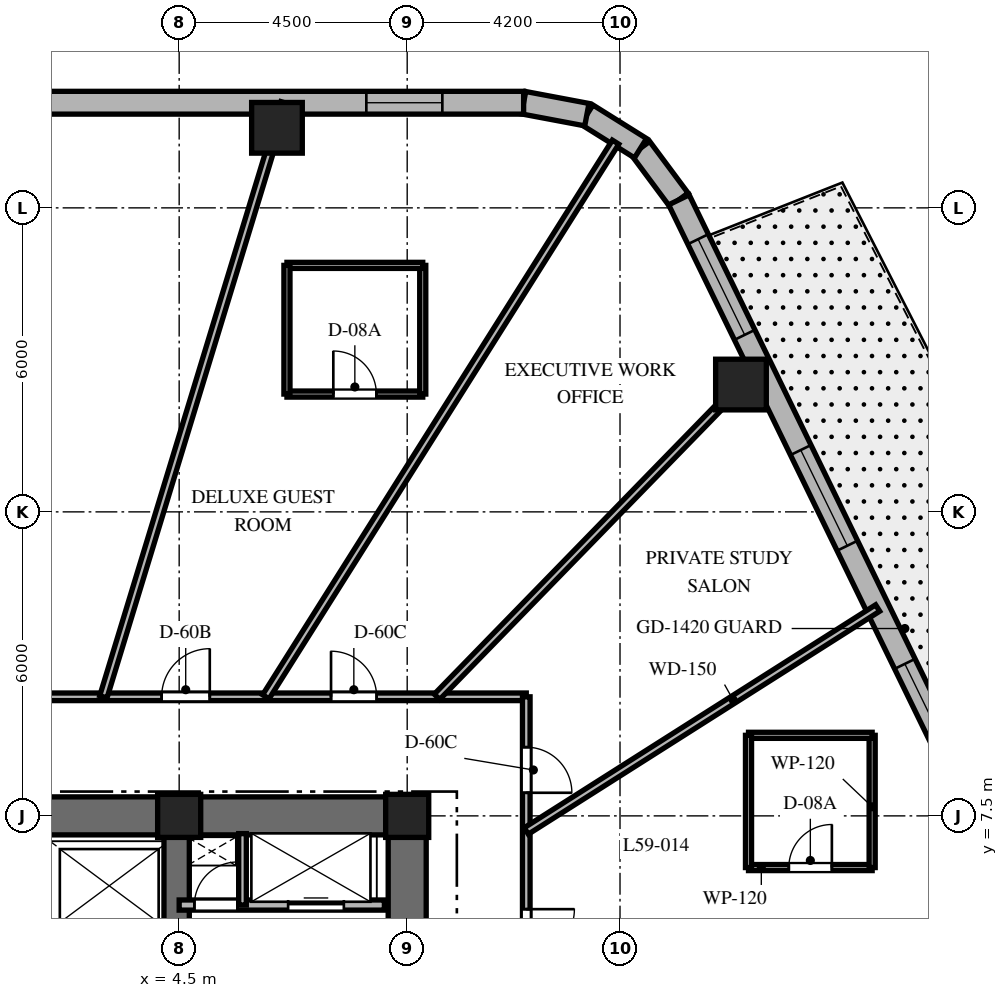
"""IFC4 building model, lengths in metres.
Left out: names, types, materials, properties, quantities, classifications, styles, units other than length and angle.
Written with IfcOpenShell. Run it as: python <this file> out.ifc"""

import sys

from ifc_helpers import new_model, si_unit, direction, frame, frame_2d, origin, origin_2d, place, context, subcontext, project, spatial, rectangle, extrude, element, fill, save


model = new_model("IFC4")
c1 = context("Model", 3, precision=1e-05, world=origin(), true_north=direction((0.0, 1.0)))
c2 = subcontext(c1, "Body", "Model", "MODEL_VIEW")
j1 = project(units=[si_unit("LENGTHUNIT", "METRE"), si_unit("PLANEANGLEUNIT", "RADIAN")], contexts=[c1])
p1 = place(None, origin())
s1 = spatial("IfcSite", under=j1, at=p1, CompositionType="ELEMENT")
p2 = place(p1, origin())
s2 = spatial("IfcBuilding", under=s1, at=p2, CompositionType="ELEMENT")
p3 = place(p2, frame((0.0, 0.0, 236.9)))
s3 = spatial("IfcBuildingStorey", under=s2, at=p3, CompositionType="ELEMENT", Elevation=236.9)
p4 = place(p3, frame((1.85, 7.5, 0.0), z_axis=(0.0, 0.0, 1.0), x_axis=(1.0, 0.0, 0.0)))
e1 = element("IfcWall", 1, at=p4, inside=s3, PredefinedType="SHEAR", context=c2, shape_type="SweptSolid", body=[
    extrude(rectangle(XDim=7.525, YDim=0.75, at=frame_2d((3.762, 0.0))), origin(), (0.0, 0.0, 1.0), 3.8),
])
p5 = place(p3, frame((9.0, -7.125, 0.0), z_axis=(0.0, 0.0, 1.0), x_axis=(0.0, 1.0, 0.0)))
e2 = element("IfcWall", 2, at=p5, inside=s3, PredefinedType="SHEAR", context=c2, shape_type="SweptSolid", body=[
    extrude(rectangle(XDim=14.25, YDim=0.75, at=frame_2d((7.125, 0.0))), origin(), (0.0, 0.0, 1.0), 3.8),
])
p6 = place(p5, frame((10.25, 0.0, 0.0)))
e3 = element("IfcOpeningElement", 3, at=p6, cuts=e2, PredefinedType="OPENING", context=c2, shape_type="SweptSolid", body=[
    extrude(rectangle(XDim=1.05, YDim=2.15, at=frame_2d((0.525, 1.075))), frame((0.0, 0.385, 0.0), z_axis=(0.0, -1.0, 0.0), x_axis=(1.0, 0.0, 0.0)), (0.0, 0.0, 1.0), 0.77),
])
p7 = place(p3, frame((4.45, 2.25, 0.0), z_axis=(0.0, 0.0, 1.0), x_axis=(0.0, 1.0, 0.0)))
e4 = element("IfcWall", 4, at=p7, inside=s3, PredefinedType="SHEAR", context=c2, shape_type="SweptSolid", body=[
    extrude(rectangle(XDim=4.875, YDim=0.5, at=frame_2d((2.438, 0.0))), origin(), (0.0, 0.0, 1.0), 3.8),
])
for number, where, z_axis, x_axis in (
    (5, (9.0, 7.5, 0.0), (0.0, 0.0, 1.0), (1.0, 0.0, 0.0)),
    (6, (4.5, 7.5, 0.0), (0.0, 0.0, 1.0), (1.0, 0.0, 0.0)),
):
    element("IfcColumn", number, at=place(p3, frame(where, z_axis=z_axis, x_axis=x_axis)), inside=s3, PredefinedType="COLUMN", context=c2, shape_type="SweptSolid", body=[
        extrude(rectangle(XDim=0.85, YDim=0.85, at=origin_2d()), origin(), (0.0, 0.0, 1.0), 3.8),
    ])
for number, where, z_axis, x_axis in (
    (7, (15.587, 16.013, 0.0), (0.0, 0.0, 1.0), (1.0, 0.0, 0.0)),
    (8, (6.43, 21.08, 0.0), (0.0, 0.0, 1.0), (1.0, 0.0, 0.0)),
):
    element("IfcColumn", number, at=place(p3, frame(where, z_axis=z_axis, x_axis=x_axis)), inside=s3, PredefinedType="COLUMN", context=c2, shape_type="SweptSolid", body=[
        extrude(rectangle(XDim=1.0, YDim=1.0, at=origin_2d()), origin(), (0.0, 0.0, 1.0), 3.8),
    ])
p8 = place(p3, frame((14.362, 19.658, 0.0), z_axis=(0.0, 0.0, 1.0), x_axis=(-0.596642462792, 0.80250717853, 0.0)))
e9 = element("IfcWall", 9, at=p8, inside=s3, PredefinedType="SOLIDWALL", context=c2, shape_type="SweptSolid", body=[
    extrude(rectangle(XDim=1.27, YDim=0.45, at=frame_2d((0.635, 0.0))), origin(), (0.0, 0.0, 1.0), 3.5),
])
p9 = place(p3, frame((13.604, 20.678, 0.0), z_axis=(0.0, 0.0, 1.0), x_axis=(-0.847910404124, 0.53013955387, 0.0)))
e10 = element("IfcWall", 10, at=p9, inside=s3, PredefinedType="SOLIDWALL", context=c2, shape_type="SweptSolid", body=[
    extrude(rectangle(XDim=1.249, YDim=0.45, at=frame_2d((0.624, 0.0))), origin(), (0.0, 0.0, 1.0), 3.5),
])
p10 = place(p3, frame((12.546, 21.34, 0.0), z_axis=(0.0, 0.0, 1.0), x_axis=(-0.982686750835, 0.18527479519, 0.0)))
e11 = element("IfcWall", 11, at=p10, inside=s3, PredefinedType="SOLIDWALL", context=c2, shape_type="SweptSolid", body=[
    extrude(rectangle(XDim=1.27, YDim=0.45, at=frame_2d((0.635, 0.0))), origin(), (0.0, 0.0, 1.0), 3.5),
])
p11 = place(p3, frame((22.74, 2.452, 0.0), z_axis=(0.0, 0.0, 1.0), x_axis=(-0.437753424814, 0.899095066755, 0.0)))
e12 = element("IfcWall", 12, at=p11, inside=s3, PredefinedType="SOLIDWALL", context=c2, shape_type="SweptSolid", body=[
    extrude(rectangle(XDim=19.137, YDim=0.45, at=frame_2d((9.569, 0.0))), origin(), (0.0, 0.0, 1.0), 3.5),
])
p12 = place(p11, frame((4.763, 0.0, 0.0)))
e13 = element("IfcOpeningElement", 13, at=p12, cuts=e12, PredefinedType="OPENING", context=c2, shape_type="SweptSolid", body=[
    extrude(rectangle(XDim=1.0, YDim=2.15, at=frame_2d((0.5, 1.075))), frame((0.0, 0.235, 0.0), z_axis=(0.0, -1.0, 0.0), x_axis=(1.0, 0.0, 0.0)), (0.0, 0.0, 1.0), 0.47),
])
p13 = place(p11, frame((6.851, 0.0, 0.8)))
e14 = element("IfcOpeningElement", 14, at=p13, cuts=e12, PredefinedType="OPENING", context=c2, shape_type="SweptSolid", body=[
    extrude(rectangle(XDim=2.1, YDim=1.85, at=frame_2d((1.05, 0.925))), frame((0.0, 0.235, 0.0), z_axis=(0.0, -1.0, 0.0), x_axis=(1.0, 0.0, 0.0)), (0.0, 0.0, 1.0), 0.47),
])
p14 = place(p11, frame((11.545, 0.0, 0.8)))
e15 = element("IfcOpeningElement", 15, at=p14, cuts=e12, PredefinedType="OPENING", context=c2, shape_type="SweptSolid", body=[
    extrude(rectangle(XDim=2.1, YDim=1.85, at=frame_2d((1.05, 0.925))), frame((0.0, 0.235, 0.0), z_axis=(0.0, -1.0, 0.0), x_axis=(1.0, 0.0, 0.0)), (0.0, 0.0, 1.0), 0.47),
])
p15 = place(p11, frame((16.173, 0.0, 0.8)))
e16 = element("IfcOpeningElement", 16, at=p15, cuts=e12, PredefinedType="OPENING", context=c2, shape_type="SweptSolid", body=[
    extrude(rectangle(XDim=2.1, YDim=1.85, at=frame_2d((1.05, 0.925))), frame((0.0, 0.235, 0.0), z_axis=(0.0, -1.0, 0.0), x_axis=(1.0, 0.0, 0.0)), (0.0, 0.0, 1.0), 0.47),
])
p16 = place(p11, frame((0.916, 0.0, 0.8)))
e17 = element("IfcOpeningElement", 17, at=p16, cuts=e12, PredefinedType="OPENING", context=c2, shape_type="SweptSolid", body=[
    extrude(rectangle(XDim=2.1, YDim=1.85, at=frame_2d((1.05, 0.925))), frame((0.0, 0.235, 0.0), z_axis=(0.0, -1.0, 0.0), x_axis=(1.0, 0.0, 0.0)), (0.0, 0.0, 1.0), 0.47),
])
p17 = place(p3, frame((11.298, 21.575, 0.0), z_axis=(0.0, 0.0, 1.0), x_axis=(-1.0, 0.0, 0.0)))
e18 = element("IfcWall", 18, at=p17, inside=s3, PredefinedType="SOLIDWALL", context=c2, shape_type="SweptSolid", body=[
    extrude(rectangle(XDim=24.399, YDim=0.45, at=frame_2d((12.2, 0.0))), origin(), (0.0, 0.0, 1.0), 3.5),
])
p18 = place(p17, frame((1.604, 0.0, 0.8)))
e19 = element("IfcOpeningElement", 19, at=p18, cuts=e18, PredefinedType="OPENING", context=c2, shape_type="SweptSolid", body=[
    extrude(rectangle(XDim=1.5, YDim=1.8, at=frame_2d((0.75, 0.9))), frame((0.0, 0.235, 0.0), z_axis=(0.0, -1.0, 0.0), x_axis=(1.0, 0.0, 0.0)), (0.0, 0.0, 1.0), 0.47),
])
p19 = place(p17, frame((11.451, 0.0, 0.8)))
e20 = element("IfcOpeningElement", 20, at=p19, cuts=e18, PredefinedType="OPENING", context=c2, shape_type="SweptSolid", body=[
    extrude(rectangle(XDim=1.5, YDim=1.8, at=frame_2d((0.75, 0.9))), frame((0.0, 0.235, 0.0), z_axis=(0.0, -1.0, 0.0), x_axis=(1.0, 0.0, 0.0)), (0.0, 0.0, 1.0), 0.47),
])
p20 = place(p17, frame((21.296, 0.0, 0.8)))
e21 = element("IfcOpeningElement", 21, at=p20, cuts=e18, PredefinedType="OPENING", context=c2, shape_type="SweptSolid", body=[
    extrude(rectangle(XDim=1.5, YDim=1.8, at=frame_2d((0.75, 0.9))), frame((0.0, 0.235, 0.0), z_axis=(0.0, -1.0, 0.0), x_axis=(1.0, 0.0, 0.0)), (0.0, 0.0, 1.0), 0.47),
])
p21 = place(p3, frame((4.5, 5.74, 0.0), z_axis=(0.0, 0.0, 1.0), x_axis=(1.0, 0.0, 0.0)))
e22 = element("IfcWall", 22, at=p21, inside=s3, PredefinedType="PARTITIONING", context=c2, shape_type="SweptSolid", body=[
    extrude(rectangle(XDim=4.05, YDim=0.2, at=frame_2d((2.025, 0.0))), origin(), (0.0, 0.0, 1.0), 3.5),
])
p22 = place(p21, frame((0.3, 0.0, 0.0)))
e23 = element("IfcOpeningElement", 23, at=p22, cuts=e22, PredefinedType="OPENING", context=c2, shape_type="SweptSolid", body=[
    extrude(rectangle(XDim=0.85, YDim=2.03, at=frame_2d((0.425, 1.015))), frame((0.0, 0.11, 0.0), z_axis=(0.0, -1.0, 0.0), x_axis=(1.0, 0.0, 0.0)), (0.0, 0.0, 1.0), 0.22),
])
p23 = place(p21, frame((2.15, 0.0, 0.0)))
e24 = element("IfcOpeningElement", 24, at=p23, cuts=e22, PredefinedType="OPENING", context=c2, shape_type="SweptSolid", body=[
    extrude(rectangle(XDim=1.1, YDim=2.2, at=frame_2d((0.55, 1.1))), frame((0.0, 0.11, 0.0), z_axis=(0.0, -1.0, 0.0), x_axis=(1.0, 0.0, 0.0)), (0.0, 0.0, 1.0), 0.22),
])
p24 = place(p3, frame((5.75, 5.74, 0.0), z_axis=(0.0, 0.0, 1.0), x_axis=(0.0, 1.0, 0.0)))
e25 = element("IfcWall", 25, at=p24, inside=s3, PredefinedType="PARTITIONING", context=c2, shape_type="SweptSolid", body=[
    extrude(rectangle(XDim=1.41, YDim=0.15, at=frame_2d((0.705, 0.0))), origin(), (0.0, 0.0, 1.0), 3.5),
])
p25 = place(p3, frame((0.92, 9.85, 0.0), z_axis=(0.0, 0.0, 1.0), x_axis=(1.0, 0.0, 0.0)))
e26 = element("IfcWall", 26, at=p25, inside=s3, PredefinedType="PARTITIONING", context=c2, shape_type="SweptSolid", body=[
    extrude(rectangle(XDim=10.43, YDim=0.15, at=frame_2d((5.215, 0.0))), origin(), (0.0, 0.0, 1.0), 2.99),
])
p26 = place(p25, frame((6.577, 0.0, 0.0)))
e27 = element("IfcOpeningElement", 27, at=p26, cuts=e26, PredefinedType="OPENING", context=c2, shape_type="SweptSolid", body=[
    extrude(rectangle(XDim=0.9, YDim=2.03, at=frame_2d((0.45, 1.015))), frame((0.0, 0.085, 0.0), z_axis=(0.0, -1.0, 0.0), x_axis=(1.0, 0.0, 0.0)), (0.0, 0.0, 1.0), 0.17),
])
p27 = place(p25, frame((3.234, 0.0, 0.0)))
e28 = element("IfcOpeningElement", 28, at=p27, cuts=e26, PredefinedType="OPENING", context=c2, shape_type="SweptSolid", body=[
    extrude(rectangle(XDim=0.95, YDim=2.03, at=frame_2d((0.475, 1.015))), frame((0.0, 0.085, 0.0), z_axis=(0.0, -1.0, 0.0), x_axis=(1.0, 0.0, 0.0)), (0.0, 0.0, 1.0), 0.17),
])
p28 = place(p3, frame((11.35, 9.85, 0.0), z_axis=(0.0, 0.0, 1.0), x_axis=(0.0, -1.0, 0.0)))
e29 = element("IfcWall", 29, at=p28, inside=s3, PredefinedType="PARTITIONING", context=c2, shape_type="SweptSolid", body=[
    extrude(rectangle(XDim=12.4, YDim=0.15, at=frame_2d((6.2, 0.0))), origin(), (0.0, 0.0, 1.0), 2.99),
])
p29 = place(p28, frame((4.191, 0.0, 0.0)))
e30 = element("IfcOpeningElement", 30, at=p29, cuts=e29, PredefinedType="OPENING", context=c2, shape_type="SweptSolid", body=[
    extrude(rectangle(XDim=0.95, YDim=2.03, at=frame_2d((0.475, 1.015))), frame((0.0, 0.085, 0.0), z_axis=(0.0, -1.0, 0.0), x_axis=(1.0, 0.0, 0.0)), (0.0, 0.0, 1.0), 0.17),
])
p30 = place(p28, frame((0.994, 0.0, 0.0)))
e31 = element("IfcOpeningElement", 31, at=p30, cuts=e29, PredefinedType="OPENING", context=c2, shape_type="SweptSolid", body=[
    extrude(rectangle(XDim=0.9, YDim=2.03, at=frame_2d((0.45, 1.015))), frame((0.0, 0.085, 0.0), z_axis=(0.0, -1.0, 0.0), x_axis=(1.0, 0.0, 0.0)), (0.0, 0.0, 1.0), 0.17),
])
p31 = place(p28, frame((8.835, 0.0, 0.0)))
e32 = element("IfcOpeningElement", 32, at=p31, cuts=e29, PredefinedType="OPENING", context=c2, shape_type="SweptSolid", body=[
    extrude(rectangle(XDim=0.95, YDim=2.03, at=frame_2d((0.475, 1.015))), frame((0.0, 0.085, 0.0), z_axis=(0.0, -1.0, 0.0), x_axis=(1.0, 0.0, 0.0)), (0.0, 0.0, 1.0), 0.17),
])
p32 = place(p3, frame((11.35, 3.121, 0.0), z_axis=(0.0, 0.0, 1.0), x_axis=(0.964212793822, 0.265129568758, 0.0)))
e33 = element("IfcWall", 33, at=p32, inside=s3, PredefinedType="PARTITIONING", context=c2, shape_type="SweptSolid", body=[
    extrude(rectangle(XDim=10.12, YDim=0.15, at=frame_2d((5.06, 0.0))), origin(), (0.0, 0.0, 1.0), 2.74),
])
p33 = place(p3, frame((11.35, 7.202, 0.0), z_axis=(0.0, 0.0, 1.0), x_axis=(0.844364592263, 0.535769013039, 0.0)))
e34 = element("IfcWall", 34, at=p33, inside=s3, PredefinedType="PARTITIONING", context=c2, shape_type="SweptSolid", body=[
    extrude(rectangle(XDim=8.213, YDim=0.15, at=frame_2d((4.106, 0.0))), origin(), (0.0, 0.0, 1.0), 2.74),
])
p34 = place(p3, frame((9.588, 9.85, 0.0), z_axis=(0.0, 0.0, 1.0), x_axis=(0.697519469595, 0.716565830567, 0.0)))
e35 = element("IfcWall", 35, at=p34, inside=s3, PredefinedType="PARTITIONING", context=c2, shape_type="SweptSolid", body=[
    extrude(rectangle(XDim=9.126, YDim=0.15, at=frame_2d((4.563, 0.0))), origin(), (0.0, 0.0, 1.0), 2.74),
])
p35 = place(p3, frame((6.21, 9.85, 0.0), z_axis=(0.0, 0.0, 1.0), x_axis=(0.533335553786, 0.84590376939, 0.0)))
e36 = element("IfcWall", 36, at=p35, inside=s3, PredefinedType="PARTITIONING", context=c2, shape_type="SweptSolid", body=[
    extrude(rectangle(XDim=12.941, YDim=0.15, at=frame_2d((6.47, 0.0))), origin(), (0.0, 0.0, 1.0), 2.74),
])
p36 = place(p3, frame((3.004, 9.85, 0.0), z_axis=(0.0, 0.0, 1.0), x_axis=(0.291775760688, 0.956486751333, 0.0)))
e37 = element("IfcWall", 37, at=p36, inside=s3, PredefinedType="PARTITIONING", context=c2, shape_type="SweptSolid", body=[
    extrude(rectangle(XDim=12.258, YDim=0.15, at=frame_2d((6.129, 0.0))), origin(), (0.0, 0.0, 1.0), 2.74),
])
p37 = place(p3, frame((15.736, 6.48, 0.0), z_axis=(0.0, 0.0, 1.0), x_axis=(1.0, 0.0, 0.0)))
e38 = element("IfcWall", 38, at=p37, inside=s3, PredefinedType="PARTITIONING", context=c2, shape_type="SweptSolid", body=[
    extrude(rectangle(XDim=2.44, YDim=0.12, at=frame_2d((1.22, 0.0))), origin(), (0.0, 0.0, 1.0), 2.99),
])
p38 = place(p37, frame((0.795, 0.0, 0.0)))
e39 = element("IfcOpeningElement", 39, at=p38, cuts=e38, PredefinedType="OPENING", context=c2, shape_type="SweptSolid", body=[
    extrude(rectangle(XDim=0.85, YDim=2.03, at=frame_2d((0.425, 1.015))), frame((0.0, 0.07, 0.0), z_axis=(0.0, -1.0, 0.0), x_axis=(1.0, 0.0, 0.0)), (0.0, 0.0, 1.0), 0.14),
])
p39 = place(p3, frame((18.176, 6.48, 0.0), z_axis=(0.0, 0.0, 1.0), x_axis=(0.0, 1.0, 0.0)))
e40 = element("IfcWall", 40, at=p39, inside=s3, PredefinedType="PARTITIONING", context=c2, shape_type="SweptSolid", body=[
    extrude(rectangle(XDim=2.61, YDim=0.12, at=frame_2d((1.305, 0.0))), origin(), (0.0, 0.0, 1.0), 3.5),
])
p40 = place(p3, frame((18.176, 9.09, 0.0), z_axis=(0.0, 0.0, 1.0), x_axis=(-1.0, 0.0, 0.0)))
e41 = element("IfcWall", 41, at=p40, inside=s3, PredefinedType="PARTITIONING", context=c2, shape_type="SweptSolid", body=[
    extrude(rectangle(XDim=2.44, YDim=0.12, at=frame_2d((1.22, 0.0))), origin(), (0.0, 0.0, 1.0), 3.5),
])
p41 = place(p3, frame((15.736, 9.09, 0.0), z_axis=(0.0, 0.0, 1.0), x_axis=(0.0, -1.0, 0.0)))
e42 = element("IfcWall", 42, at=p41, inside=s3, PredefinedType="PARTITIONING", context=c2, shape_type="SweptSolid", body=[
    extrude(rectangle(XDim=2.61, YDim=0.12, at=frame_2d((1.305, 0.0))), origin(), (0.0, 0.0, 1.0), 2.99),
])
p42 = place(p3, frame((6.627, 15.825, 0.0), z_axis=(0.0, 0.0, 1.0), x_axis=(1.0, 0.0, 0.0)))
e43 = element("IfcWall", 43, at=p42, inside=s3, PredefinedType="PARTITIONING", context=c2, shape_type="SweptSolid", body=[
    extrude(rectangle(XDim=2.68, YDim=0.12, at=frame_2d((1.34, 0.0))), origin(), (0.0, 0.0, 1.0), 3.073),
])
p43 = place(p42, frame((0.915, 0.0, 0.0)))
e44 = element("IfcOpeningElement", 44, at=p43, cuts=e43, PredefinedType="OPENING", context=c2, shape_type="SweptSolid", body=[
    extrude(rectangle(XDim=0.85, YDim=2.03, at=frame_2d((0.425, 1.015))), frame((0.0, 0.07, 0.0), z_axis=(0.0, -1.0, 0.0), x_axis=(1.0, 0.0, 0.0)), (0.0, 0.0, 1.0), 0.14),
])
p44 = place(p3, frame((9.307, 15.825, 0.0), z_axis=(0.0, 0.0, 1.0), x_axis=(0.0, 1.0, 0.0)))
e45 = element("IfcWall", 45, at=p44, inside=s3, PredefinedType="PARTITIONING", context=c2, shape_type="SweptSolid", body=[
    extrude(rectangle(XDim=2.54, YDim=0.12, at=frame_2d((1.27, 0.0))), origin(), (0.0, 0.0, 1.0), 3.5),
])
p45 = place(p3, frame((9.307, 18.365, 0.0), z_axis=(0.0, 0.0, 1.0), x_axis=(-1.0, 0.0, 0.0)))
e46 = element("IfcWall", 46, at=p45, inside=s3, PredefinedType="PARTITIONING", context=c2, shape_type="SweptSolid", body=[
    extrude(rectangle(XDim=2.68, YDim=0.12, at=frame_2d((1.34, 0.0))), origin(), (0.0, 0.0, 1.0), 3.5),
])
p46 = place(p3, frame((6.627, 18.365, 0.0), z_axis=(0.0, 0.0, 1.0), x_axis=(0.0, -1.0, 0.0)))
e47 = element("IfcWall", 47, at=p46, inside=s3, PredefinedType="PARTITIONING", context=c2, shape_type="SweptSolid", body=[
    extrude(rectangle(XDim=2.54, YDim=0.12, at=frame_2d((1.27, 0.0))), origin(), (0.0, 0.0, 1.0), 3.073),
])
p47 = place(p13, origin())
e48 = element("IfcWindow", 48, at=p47, inside=s3, PartitioningType="SINGLE_PANEL", PredefinedType="WINDOW", context=c2, shape_type="SweptSolid", body=[
    extrude(rectangle(XDim=2.1, YDim=1.85, at=frame_2d((1.05, 0.925))), frame((0.0, 0.03, 0.0), z_axis=(0.0, -1.0, 0.0), x_axis=(1.0, 0.0, 0.0)), (0.0, 0.0, 1.0), 0.06),
])
fill(e14, e48)
p48 = place(p14, origin())
e49 = element("IfcWindow", 49, at=p48, inside=s3, PartitioningType="SINGLE_PANEL", PredefinedType="WINDOW", context=c2, shape_type="SweptSolid", body=[
    extrude(rectangle(XDim=2.1, YDim=1.85, at=frame_2d((1.05, 0.925))), frame((0.0, 0.03, 0.0), z_axis=(0.0, -1.0, 0.0), x_axis=(1.0, 0.0, 0.0)), (0.0, 0.0, 1.0), 0.06),
])
fill(e15, e49)
p49 = place(p15, origin())
e50 = element("IfcWindow", 50, at=p49, inside=s3, PartitioningType="SINGLE_PANEL", PredefinedType="WINDOW", context=c2, shape_type="SweptSolid", body=[
    extrude(rectangle(XDim=2.1, YDim=1.85, at=frame_2d((1.05, 0.925))), frame((0.0, 0.03, 0.0), z_axis=(0.0, -1.0, 0.0), x_axis=(1.0, 0.0, 0.0)), (0.0, 0.0, 1.0), 0.06),
])
fill(e16, e50)
p50 = place(p18, origin())
e51 = element("IfcWindow", 51, at=p50, inside=s3, PartitioningType="SINGLE_PANEL", PredefinedType="WINDOW", context=c2, shape_type="SweptSolid", body=[
    extrude(rectangle(XDim=1.5, YDim=1.8, at=frame_2d((0.75, 0.9))), frame((0.0, 0.03, 0.0), z_axis=(0.0, -1.0, 0.0), x_axis=(1.0, 0.0, 0.0)), (0.0, 0.0, 1.0), 0.06),
])
fill(e19, e51)
p51 = place(p22, origin())
e52 = element("IfcDoor", 52, at=p51, inside=s3, OperationType="SINGLE_SWING_RIGHT", PredefinedType="DOOR", context=c2, shape_type="SweptSolid", body=[
    extrude(rectangle(XDim=0.85, YDim=2.03, at=frame_2d((0.425, 1.015))), frame((0.0, 0.025, 0.0), z_axis=(0.0, -1.0, 0.0), x_axis=(1.0, 0.0, 0.0)), (0.0, 0.0, 1.0), 0.05),
])
fill(e23, e52)
p52 = place(p23, origin())
e53 = element("IfcDoor", 53, at=p52, inside=s3, OperationType="SLIDING_TO_RIGHT", PredefinedType="DOOR", context=c2, shape_type="SweptSolid", body=[
    extrude(rectangle(XDim=1.1, YDim=2.2, at=frame_2d((0.55, 1.1))), frame((0.0, 0.025, 0.0), z_axis=(0.0, -1.0, 0.0), x_axis=(1.0, 0.0, 0.0)), (0.0, 0.0, 1.0), 0.05),
])
fill(e24, e53)
p53 = place(p29, origin())
e54 = element("IfcDoor", 54, at=p53, inside=s3, OperationType="SINGLE_SWING_LEFT", PredefinedType="DOOR", context=c2, shape_type="SweptSolid", body=[
    extrude(rectangle(XDim=0.95, YDim=2.03, at=frame_2d((0.475, 1.015))), frame((0.0, 0.025, 0.0), z_axis=(0.0, -1.0, 0.0), x_axis=(1.0, 0.0, 0.0)), (0.0, 0.0, 1.0), 0.05),
])
fill(e30, e54)
p54 = place(p38, origin())
e55 = element("IfcDoor", 55, at=p54, inside=s3, OperationType="SINGLE_SWING_RIGHT", PredefinedType="DOOR", context=c2, shape_type="SweptSolid", body=[
    extrude(rectangle(XDim=0.85, YDim=2.03, at=frame_2d((0.425, 1.015))), frame((0.0, 0.025, 0.0), z_axis=(0.0, -1.0, 0.0), x_axis=(1.0, 0.0, 0.0)), (0.0, 0.0, 1.0), 0.05),
])
fill(e39, e55)
p55 = place(p30, origin())
e56 = element("IfcDoor", 56, at=p55, inside=s3, OperationType="SINGLE_SWING_RIGHT", PredefinedType="DOOR", context=c2, shape_type="SweptSolid", body=[
    extrude(rectangle(XDim=0.9, YDim=2.03, at=frame_2d((0.45, 1.015))), frame((0.0, 0.025, 0.0), z_axis=(0.0, -1.0, 0.0), x_axis=(1.0, 0.0, 0.0)), (0.0, 0.0, 1.0), 0.05),
])
fill(e31, e56)
p56 = place(p26, origin())
e57 = element("IfcDoor", 57, at=p56, inside=s3, OperationType="SINGLE_SWING_LEFT", PredefinedType="DOOR", context=c2, shape_type="SweptSolid", body=[
    extrude(rectangle(XDim=0.9, YDim=2.03, at=frame_2d((0.45, 1.015))), frame((0.0, 0.025, 0.0), z_axis=(0.0, -1.0, 0.0), x_axis=(1.0, 0.0, 0.0)), (0.0, 0.0, 1.0), 0.05),
])
fill(e27, e57)
p57 = place(p27, origin())
e58 = element("IfcDoor", 58, at=p57, inside=s3, OperationType="SINGLE_SWING_RIGHT", PredefinedType="DOOR", context=c2, shape_type="SweptSolid", body=[
    extrude(rectangle(XDim=0.95, YDim=2.03, at=frame_2d((0.475, 1.015))), frame((0.0, 0.025, 0.0), z_axis=(0.0, -1.0, 0.0), x_axis=(1.0, 0.0, 0.0)), (0.0, 0.0, 1.0), 0.05),
])
fill(e28, e58)
p58 = place(p43, origin())
e59 = element("IfcDoor", 59, at=p58, inside=s3, OperationType="SINGLE_SWING_LEFT", PredefinedType="DOOR", context=c2, shape_type="SweptSolid", body=[
    extrude(rectangle(XDim=0.85, YDim=2.03, at=frame_2d((0.425, 1.015))), frame((0.0, 0.025, 0.0), z_axis=(0.0, -1.0, 0.0), x_axis=(1.0, 0.0, 0.0)), (0.0, 0.0, 1.0), 0.05),
])
fill(e44, e59)
save(model, sys.argv[1])
